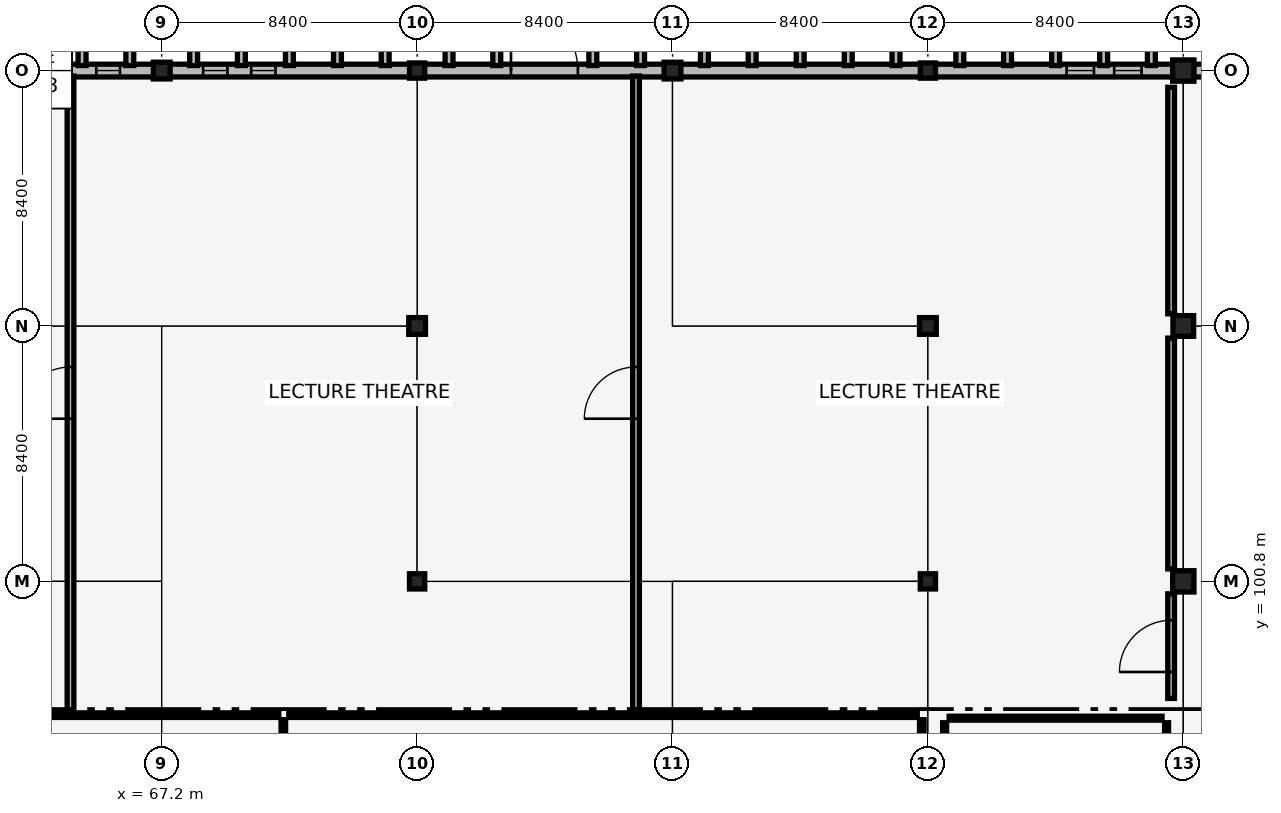
"""IFC4 building model, lengths in metres.
Left out: names, types, materials, properties, quantities, classifications, styles, units other than length and angle.
Written with IfcOpenShell. Run it as: python <this file> out.ifc"""

import sys

from ifc_helpers import new_model, si_unit, direction, frame, frame_2d, origin, origin_2d, place, context, subcontext, project, spatial, rectangle, extrude, element, fill, save


model = new_model("IFC4")
c1 = context("Model", 3, precision=1e-05, world=origin(), true_north=direction((0.0, 1.0)))
c2 = subcontext(c1, "Body", "Model", "MODEL_VIEW")
j1 = project(units=[si_unit("LENGTHUNIT", "METRE"), si_unit("PLANEANGLEUNIT", "RADIAN")], contexts=[c1])
p1 = place(None, origin())
s1 = spatial("IfcSite", under=j1, at=p1, CompositionType="ELEMENT")
p2 = place(p1, origin())
s2 = spatial("IfcBuilding", under=s1, at=p2, CompositionType="ELEMENT")
p3 = place(p2, origin())
s3 = spatial("IfcBuildingStorey", under=s2, at=p3, CompositionType="ELEMENT", Elevation=0.0)
p4 = place(p3, frame((67.2, 117.6, -0.32), z_axis=(0.0, 0.0, 1.0), x_axis=(1.0, 0.0, 0.0)))
e1 = element("IfcColumn", 1, at=p4, inside=s3, PredefinedType="COLUMN", context=c2, shape_type="SweptSolid", body=[
    extrude(rectangle(XDim=0.55, YDim=0.55, at=origin_2d()), origin(), (0.0, 0.0, 1.0), 5.46),
])
p5 = place(p3, frame((75.6, 100.8, -0.32), z_axis=(0.0, 0.0, 1.0), x_axis=(1.0, 0.0, 0.0)))
e2 = element("IfcColumn", 2, at=p5, inside=s3, PredefinedType="COLUMN", context=c2, shape_type="SweptSolid", body=[
    extrude(rectangle(XDim=0.5, YDim=0.5, at=origin_2d()), origin(), (0.0, 0.0, 1.0), 5.46),
])
p6 = place(p3, frame((75.6, 109.2, -0.32), z_axis=(0.0, 0.0, 1.0), x_axis=(1.0, 0.0, 0.0)))
e3 = element("IfcColumn", 3, at=p6, inside=s3, PredefinedType="COLUMN", context=c2, shape_type="SweptSolid", body=[
    extrude(rectangle(XDim=0.55, YDim=0.55, at=origin_2d()), origin(), (0.0, 0.0, 1.0), 5.46),
])
p7 = place(p3, frame((75.6, 117.6, -0.32), z_axis=(0.0, 0.0, 1.0), x_axis=(1.0, 0.0, 0.0)))
e4 = element("IfcColumn", 4, at=p7, inside=s3, PredefinedType="COLUMN", context=c2, shape_type="SweptSolid", body=[
    extrude(rectangle(XDim=0.5, YDim=0.5, at=origin_2d()), origin(), (0.0, 0.0, 1.0), 5.46),
])
p8 = place(p3, frame((84.0, 117.6, -0.32), z_axis=(0.0, 0.0, 1.0), x_axis=(1.0, 0.0, 0.0)))
e5 = element("IfcColumn", 5, at=p8, inside=s3, PredefinedType="COLUMN", context=c2, shape_type="SweptSolid", body=[
    extrude(rectangle(XDim=0.55, YDim=0.55, at=origin_2d()), origin(), (0.0, 0.0, 1.0), 5.46),
])
p9 = place(p3, frame((92.4, 100.8, -0.32), z_axis=(0.0, 0.0, 1.0), x_axis=(1.0, 0.0, 0.0)))
e6 = element("IfcColumn", 6, at=p9, inside=s3, PredefinedType="COLUMN", context=c2, shape_type="SweptSolid", body=[
    extrude(rectangle(XDim=0.5, YDim=0.5, at=origin_2d()), origin(), (0.0, 0.0, 1.0), 5.46),
])
p10 = place(p3, frame((92.4, 109.2, -0.32), z_axis=(0.0, 0.0, 1.0), x_axis=(1.0, 0.0, 0.0)))
e7 = element("IfcColumn", 7, at=p10, inside=s3, PredefinedType="COLUMN", context=c2, shape_type="SweptSolid", body=[
    extrude(rectangle(XDim=0.55, YDim=0.55, at=origin_2d()), origin(), (0.0, 0.0, 1.0), 5.46),
])
p11 = place(p3, frame((92.4, 117.6, -0.32), z_axis=(0.0, 0.0, 1.0), x_axis=(1.0, 0.0, 0.0)))
e8 = element("IfcColumn", 8, at=p11, inside=s3, PredefinedType="COLUMN", context=c2, shape_type="SweptSolid", body=[
    extrude(rectangle(XDim=0.5, YDim=0.5, at=origin_2d()), origin(), (0.0, 0.0, 1.0), 5.46),
])
p12 = place(p3, frame((100.8, 100.8, 0.0), z_axis=(0.0, 0.0, 1.0), x_axis=(1.0, 0.0, 0.0)))
e9 = element("IfcColumn", 9, at=p12, inside=s3, PredefinedType="COLUMN", context=c2, shape_type="SweptSolid", body=[
    extrude(rectangle(XDim=0.7, YDim=0.7, at=origin_2d()), origin(), (0.0, 0.0, 1.0), 5.14),
])
p13 = place(p3, frame((100.8, 109.2, 0.0), z_axis=(0.0, 0.0, 1.0), x_axis=(1.0, 0.0, 0.0)))
e10 = element("IfcColumn", 10, at=p13, inside=s3, PredefinedType="COLUMN", context=c2, shape_type="SweptSolid", body=[
    extrude(rectangle(XDim=0.68, YDim=0.68, at=origin_2d()), origin(), (0.0, 0.0, 1.0), 5.14),
])
p14 = place(p3, frame((100.8, 117.6, 0.0), z_axis=(0.0, 0.0, 1.0), x_axis=(1.0, 0.0, 0.0)))
e11 = element("IfcColumn", 11, at=p14, inside=s3, PredefinedType="COLUMN", context=c2, shape_type="SweptSolid", body=[
    extrude(rectangle(XDim=0.7, YDim=0.7, at=origin_2d()), origin(), (0.0, 0.0, 1.0), 5.14),
])
p15 = place(p3, frame((59.035, 117.6, 0.0), z_axis=(0.0, 0.0, 1.0), x_axis=(1.0, 0.0, 0.0)))
e12 = element("IfcWall", 12, at=p15, inside=s3, PredefinedType="SOLIDWALL", context=c2, shape_type="SweptSolid", body=[
    extrude(rectangle(XDim=7.905, YDim=0.42, at=frame_2d((3.953, 0.0))), origin(), (0.0, 0.0, 1.0), 4.4),
])
p16 = place(p15, frame((2.693, 0.0, 0.75)))
e13 = element("IfcOpeningElement", 13, at=p16, cuts=e12, PredefinedType="OPENING", context=c2, shape_type="SweptSolid", body=[
    extrude(rectangle(XDim=0.78, YDim=2.7, at=frame_2d((0.39, 1.35))), frame((0.0, 0.22, 0.0), z_axis=(0.0, -1.0, 0.0), x_axis=(1.0, 0.0, 0.0)), (0.0, 0.0, 1.0), 0.44),
])
p17 = place(p15, frame((6.013, 0.0, 0.75)))
e14 = element("IfcOpeningElement", 14, at=p17, cuts=e12, PredefinedType="OPENING", context=c2, shape_type="SweptSolid", body=[
    extrude(rectangle(XDim=0.78, YDim=2.7, at=frame_2d((0.39, 1.35))), frame((0.0, 0.22, 0.0), z_axis=(0.0, -1.0, 0.0), x_axis=(1.0, 0.0, 0.0)), (0.0, 0.0, 1.0), 0.44),
])
for number, where, z_axis, x_axis in (
    (15, (64.58, 117.765, -0.32), (0.0, 0.0, 1.0), (0.0, 1.0, 0.0)),
    (16, (66.15, 117.765, -0.32), (0.0, 0.0, 1.0), (0.0, 1.0, 0.0)),
):
    element("IfcWall", number, at=place(p3, frame(where, z_axis=z_axis, x_axis=x_axis)), inside=s3, PredefinedType="SOLIDWALL", context=c2, shape_type="SweptSolid", body=[
        extrude(rectangle(XDim=0.7, YDim=0.26, at=frame_2d((0.35, 0.0))), origin(), (0.0, 0.0, 1.0), 5.76),
    ])
p18 = place(p3, frame((67.46, 117.6, 0.0), z_axis=(0.0, 0.0, 1.0), x_axis=(1.0, 0.0, 0.0)))
e17 = element("IfcWall", 17, at=p18, inside=s3, PredefinedType="SOLIDWALL", context=c2, shape_type="SweptSolid", body=[
    extrude(rectangle(XDim=7.905, YDim=0.42, at=frame_2d((3.953, 0.0))), origin(), (0.0, 0.0, 1.0), 4.4),
])
p19 = place(p18, frame((1.102, 0.0, 0.75)))
e18 = element("IfcOpeningElement", 18, at=p19, cuts=e17, PredefinedType="OPENING", context=c2, shape_type="SweptSolid", body=[
    extrude(rectangle(XDim=0.8, YDim=2.55, at=frame_2d((0.4, 1.275))), frame((0.0, 0.22, 0.0), z_axis=(0.0, -1.0, 0.0), x_axis=(1.0, 0.0, 0.0)), (0.0, 0.0, 1.0), 0.44),
])
p20 = place(p18, frame((2.683, 0.0, 0.75)))
e19 = element("IfcOpeningElement", 19, at=p20, cuts=e17, PredefinedType="OPENING", context=c2, shape_type="SweptSolid", body=[
    extrude(rectangle(XDim=0.8, YDim=2.55, at=frame_2d((0.4, 1.275))), frame((0.0, 0.22, 0.0), z_axis=(0.0, -1.0, 0.0), x_axis=(1.0, 0.0, 0.0)), (0.0, 0.0, 1.0), 0.44),
])
for number, where, z_axis, x_axis in (
    (20, (68.25, 117.765, -0.32), (0.0, 0.0, 1.0), (0.0, 1.0, 0.0)),
    (21, (69.82, 117.765, -0.32), (0.0, 0.0, 1.0), (0.0, 1.0, 0.0)),
    (22, (71.4, 117.765, -0.32), (0.0, 0.0, 1.0), (0.0, 1.0, 0.0)),
    (23, (72.98, 117.765, -0.32), (0.0, 0.0, 1.0), (0.0, 1.0, 0.0)),
    (24, (74.55, 117.765, -0.32), (0.0, 0.0, 1.0), (0.0, 1.0, 0.0)),
):
    element("IfcWall", number, at=place(p3, frame(where, z_axis=z_axis, x_axis=x_axis)), inside=s3, PredefinedType="SOLIDWALL", context=c2, shape_type="SweptSolid", body=[
        extrude(rectangle(XDim=0.7, YDim=0.26, at=frame_2d((0.35, 0.0))), origin(), (0.0, 0.0, 1.0), 5.76),
    ])
p21 = place(p3, frame((75.835, 117.6, 0.0), z_axis=(0.0, 0.0, 1.0), x_axis=(1.0, 0.0, 0.0)))
e25 = element("IfcWall", 25, at=p21, inside=s3, PredefinedType="SOLIDWALL", context=c2, shape_type="SweptSolid", body=[
    extrude(rectangle(XDim=7.905, YDim=0.42, at=frame_2d((3.953, 0.0))), origin(), (0.0, 0.0, 1.0), 4.4),
])
p22 = place(p21, frame((2.853, 0.0, 0.0)))
e26 = element("IfcOpeningElement", 26, at=p22, cuts=e25, PredefinedType="OPENING", context=c2, shape_type="SweptSolid", body=[
    extrude(rectangle(XDim=2.2, YDim=2.4, at=frame_2d((1.1, 1.2))), frame((0.0, 0.22, 0.0), z_axis=(0.0, -1.0, 0.0), x_axis=(1.0, 0.0, 0.0)), (0.0, 0.0, 1.0), 0.44),
])
for number, where, z_axis, x_axis in (
    (27, (76.65, 117.765, -0.32), (0.0, 0.0, 1.0), (0.0, 1.0, 0.0)),
    (28, (78.22, 117.765, -0.32), (0.0, 0.0, 1.0), (0.0, 1.0, 0.0)),
    (29, (81.38, 117.765, -0.32), (0.0, 0.0, 1.0), (0.0, 1.0, 0.0)),
    (30, (82.95, 117.765, -0.32), (0.0, 0.0, 1.0), (0.0, 1.0, 0.0)),
):
    element("IfcWall", number, at=place(p3, frame(where, z_axis=z_axis, x_axis=x_axis)), inside=s3, PredefinedType="SOLIDWALL", context=c2, shape_type="SweptSolid", body=[
        extrude(rectangle(XDim=0.7, YDim=0.26, at=frame_2d((0.35, 0.0))), origin(), (0.0, 0.0, 1.0), 5.76),
    ])
p23 = place(p3, frame((84.26, 117.6, 0.0), z_axis=(0.0, 0.0, 1.0), x_axis=(1.0, 0.0, 0.0)))
e31 = element("IfcWall", 31, at=p23, inside=s3, PredefinedType="SOLIDWALL", context=c2, shape_type="SweptSolid", body=[
    extrude(rectangle(XDim=7.905, YDim=0.42, at=frame_2d((3.953, 0.0))), origin(), (0.0, 0.0, 1.0), 4.4),
])
for number, where, z_axis, x_axis in (
    (32, (85.05, 117.765, -0.32), (0.0, 0.0, 1.0), (0.0, 1.0, 0.0)),
    (33, (86.62, 117.765, -0.32), (0.0, 0.0, 1.0), (0.0, 1.0, 0.0)),
    (34, (88.2, 117.765, -0.32), (0.0, 0.0, 1.0), (0.0, 1.0, 0.0)),
    (35, (89.78, 117.765, -0.32), (0.0, 0.0, 1.0), (0.0, 1.0, 0.0)),
    (36, (91.35, 117.765, -0.32), (0.0, 0.0, 1.0), (0.0, 1.0, 0.0)),
):
    element("IfcWall", number, at=place(p3, frame(where, z_axis=z_axis, x_axis=x_axis)), inside=s3, PredefinedType="SOLIDWALL", context=c2, shape_type="SweptSolid", body=[
        extrude(rectangle(XDim=0.7, YDim=0.26, at=frame_2d((0.35, 0.0))), origin(), (0.0, 0.0, 1.0), 5.76),
    ])
p24 = place(p3, frame((92.635, 117.6, 0.0), z_axis=(0.0, 0.0, 1.0), x_axis=(1.0, 0.0, 0.0)))
e37 = element("IfcWall", 37, at=p24, inside=s3, PredefinedType="SOLIDWALL", context=c2, shape_type="SweptSolid", body=[
    extrude(rectangle(XDim=7.83, YDim=0.42, at=frame_2d((3.915, 0.0))), origin(), (0.0, 0.0, 1.0), 4.4),
])
p25 = place(p24, frame((4.326, 0.0, 0.75)))
e38 = element("IfcOpeningElement", 38, at=p25, cuts=e37, PredefinedType="OPENING", context=c2, shape_type="SweptSolid", body=[
    extrude(rectangle(XDim=0.9, YDim=3.0, at=frame_2d((0.45, 1.5))), frame((0.0, 0.22, 0.0), z_axis=(0.0, -1.0, 0.0), x_axis=(1.0, 0.0, 0.0)), (0.0, 0.0, 1.0), 0.44),
])
p26 = place(p24, frame((5.892, 0.0, 0.75)))
e39 = element("IfcOpeningElement", 39, at=p26, cuts=e37, PredefinedType="OPENING", context=c2, shape_type="SweptSolid", body=[
    extrude(rectangle(XDim=0.9, YDim=3.0, at=frame_2d((0.45, 1.5))), frame((0.0, 0.22, 0.0), z_axis=(0.0, -1.0, 0.0), x_axis=(1.0, 0.0, 0.0)), (0.0, 0.0, 1.0), 0.44),
])
for number, where, z_axis, x_axis in (
    (40, (93.45, 117.765, -0.32), (0.0, 0.0, 1.0), (0.0, 1.0, 0.0)),
    (41, (95.02, 117.765, -0.32), (0.0, 0.0, 1.0), (0.0, 1.0, 0.0)),
    (42, (96.6, 117.765, -0.32), (0.0, 0.0, 1.0), (0.0, 1.0, 0.0)),
    (43, (98.18, 117.765, -0.32), (0.0, 0.0, 1.0), (0.0, 1.0, 0.0)),
):
    element("IfcWall", number, at=place(p3, frame(where, z_axis=z_axis, x_axis=x_axis)), inside=s3, PredefinedType="SOLIDWALL", context=c2, shape_type="SweptSolid", body=[
        extrude(rectangle(XDim=0.7, YDim=0.26, at=frame_2d((0.35, 0.0))), origin(), (0.0, 0.0, 1.0), 5.76),
    ])
p27 = place(p3, frame((99.75, 117.765, -0.25), z_axis=(0.0, 0.0, 1.0), x_axis=(0.0, 1.0, 0.0)))
e44 = element("IfcWall", 44, at=p27, inside=s3, PredefinedType="SOLIDWALL", context=c2, shape_type="SweptSolid", body=[
    extrude(rectangle(XDim=0.7, YDim=0.26, at=frame_2d((0.35, 0.0))), origin(), (0.0, 0.0, 1.0), 5.69),
])
p28 = place(p3, frame((101.135, 117.6, 0.0), z_axis=(0.0, 0.0, 1.0), x_axis=(1.0, 0.0, 0.0)))
e45 = element("IfcWall", 45, at=p28, inside=s3, PredefinedType="SOLIDWALL", context=c2, shape_type="SweptSolid", body=[
    extrude(rectangle(XDim=7.74, YDim=0.42, at=frame_2d((3.87, 0.0))), origin(), (0.0, 0.0, 1.0), 4.4),
])
p29 = place(p3, frame((50.75, 96.4, 0.0), z_axis=(0.0, 0.0, 1.0), x_axis=(1.0, 0.0, 0.0)))
e46 = element("IfcWall", 46, at=p29, inside=s3, PredefinedType="PARTITIONING", context=c2, shape_type="SweptSolid", body=[
    extrude(rectangle(XDim=20.3, YDim=0.15, at=frame_2d((10.15, 0.0))), origin(), (0.0, 0.0, 1.0), 4.74),
])
p30 = place(p3, frame((71.2, 87.45, 0.0), z_axis=(0.0, 0.0, 1.0), x_axis=(0.0, 1.0, 0.0)))
e47 = element("IfcWall", 47, at=p30, inside=s3, PredefinedType="PARTITIONING", context=c2, shape_type="SweptSolid", body=[
    extrude(rectangle(XDim=8.8, YDim=0.15, at=frame_2d((4.4, 0.0))), origin(), (0.0, 0.0, 1.0), 4.46),
])
p31 = place(p3, frame((71.38, 96.4, 0.0), z_axis=(0.0, 0.0, 1.0), x_axis=(1.0, 0.0, 0.0)))
e48 = element("IfcWall", 48, at=p31, inside=s3, PredefinedType="PARTITIONING", context=c2, shape_type="SweptSolid", body=[
    extrude(rectangle(XDim=20.67, YDim=0.15, at=frame_2d((10.335, 0.0))), origin(), (0.0, 0.0, 1.0), 4.74),
])
p32 = place(p3, frame((92.2, 92.735, 0.0), z_axis=(0.0, 0.0, 1.0), x_axis=(0.0, 1.0, 0.0)))
e49 = element("IfcWall", 49, at=p32, inside=s3, PredefinedType="PARTITIONING", context=c2, shape_type="SweptSolid", body=[
    extrude(rectangle(XDim=3.515, YDim=0.15, at=frame_2d((1.757, 0.0))), origin(), (0.0, 0.0, 1.0), 5.14),
])
p33 = place(p3, frame((93.1, 96.3, 0.0), z_axis=(0.0, 0.0, 1.0), x_axis=(1.0, 0.0, 0.0)))
e50 = element("IfcWall", 50, at=p33, inside=s3, PredefinedType="PARTITIONING", context=c2, shape_type="SweptSolid", body=[
    extrude(rectangle(XDim=7.0, YDim=0.13, at=frame_2d((3.5, 0.0))), origin(), (0.0, 0.0, 1.0), 5.14),
])
for number, where, z_axis, x_axis in (
    (51, (92.95, 87.5, 0.0), (0.0, 0.0, 1.0), (0.0, 1.0, 0.0)),
    (52, (100.25, 87.5, 0.0), (0.0, 0.0, 1.0), (0.0, 1.0, 0.0)),
):
    element("IfcWall", number, at=place(p3, frame(where, z_axis=z_axis, x_axis=x_axis)), inside=s3, PredefinedType="PARTITIONING", context=c2, shape_type="SweptSolid", body=[
        extrude(rectangle(XDim=8.65, YDim=0.13, at=frame_2d((4.325, 0.0))), origin(), (0.0, 0.0, 1.0), 4.46),
    ])
p34 = place(p3, frame((64.2, 96.58, 0.0), z_axis=(0.0, 0.0, 1.0), x_axis=(0.0, 1.0, 0.0)))
e53 = element("IfcWall", 53, at=p34, inside=s3, PredefinedType="PARTITIONING", context=c2, shape_type="SweptSolid", body=[
    extrude(rectangle(XDim=20.84, YDim=0.22, at=frame_2d((10.42, 0.0))), origin(), (0.0, 0.0, 1.0), 3.74),
])
p35 = place(p34, frame((9.57, 0.0, 0.0)))
e54 = element("IfcOpeningElement", 54, at=p35, cuts=e53, PredefinedType="OPENING", context=c2, shape_type="SweptSolid", body=[
    extrude(rectangle(XDim=1.7, YDim=2.25, at=frame_2d((0.85, 1.125))), frame((0.0, 0.12, 0.0), z_axis=(0.0, -1.0, 0.0), x_axis=(1.0, 0.0, 0.0)), (0.0, 0.0, 1.0), 0.24),
])
p36 = place(p3, frame((82.8, 96.58, 0.0), z_axis=(0.0, 0.0, 1.0), x_axis=(0.0, 1.0, 0.0)))
e55 = element("IfcWall", 55, at=p36, inside=s3, PredefinedType="PARTITIONING", context=c2, shape_type="SweptSolid", body=[
    extrude(rectangle(XDim=20.84, YDim=0.22, at=frame_2d((10.42, 0.0))), origin(), (0.0, 0.0, 1.0), 3.74),
])
p37 = place(p36, frame((9.57, 0.0, 0.0)))
e56 = element("IfcOpeningElement", 56, at=p37, cuts=e55, PredefinedType="OPENING", context=c2, shape_type="SweptSolid", body=[
    extrude(rectangle(XDim=1.7, YDim=2.25, at=frame_2d((0.85, 1.125))), frame((0.0, 0.12, 0.0), z_axis=(0.0, -1.0, 0.0), x_axis=(1.0, 0.0, 0.0)), (0.0, 0.0, 1.0), 0.24),
])
p38 = place(p3, frame((100.4, 96.95, 0.0), z_axis=(0.0, 0.0, 1.0), x_axis=(0.0, 1.0, 0.0)))
e57 = element("IfcWall", 57, at=p38, inside=s3, PredefinedType="PARTITIONING", context=c2, shape_type="SweptSolid", body=[
    extrude(rectangle(XDim=3.44, YDim=0.22, at=frame_2d((1.72, 0.0))), origin(), (0.0, 0.0, 1.0), 5.14),
])
p39 = place(p38, frame((0.87, 0.0, 0.0)))
e58 = element("IfcOpeningElement", 58, at=p39, cuts=e57, PredefinedType="OPENING", context=c2, shape_type="SweptSolid", body=[
    extrude(rectangle(XDim=1.7, YDim=2.25, at=frame_2d((0.85, 1.125))), frame((0.0, 0.12, 0.0), z_axis=(0.0, -1.0, 0.0), x_axis=(1.0, 0.0, 0.0)), (0.0, 0.0, 1.0), 0.24),
])
p40 = place(p3, frame((100.4, 101.21, 0.0), z_axis=(0.0, 0.0, 1.0), x_axis=(0.0, 1.0, 0.0)))
e59 = element("IfcWall", 59, at=p40, inside=s3, PredefinedType="PARTITIONING", context=c2, shape_type="SweptSolid", body=[
    extrude(rectangle(XDim=7.59, YDim=0.22, at=frame_2d((3.795, 0.0))), origin(), (0.0, 0.0, 1.0), 5.14),
])
p41 = place(p3, frame((100.4, 109.6, 0.0), z_axis=(0.0, 0.0, 1.0), x_axis=(0.0, 1.0, 0.0)))
e60 = element("IfcWall", 60, at=p41, inside=s3, PredefinedType="PARTITIONING", context=c2, shape_type="SweptSolid", body=[
    extrude(rectangle(XDim=7.45, YDim=0.22, at=frame_2d((3.725, 0.0))), origin(), (0.0, 0.0, 1.0), 4.59),
])
p42 = place(p17, origin())
e61 = element("IfcWindow", 61, at=p42, inside=s3, PartitioningType="DOUBLE_PANEL_VERTICAL", PredefinedType="WINDOW", context=c2, shape_type="SweptSolid", body=[
    extrude(rectangle(XDim=0.78, YDim=2.7, at=frame_2d((0.39, 1.35))), frame((0.0, 0.03, 0.0), z_axis=(0.0, -1.0, 0.0), x_axis=(1.0, 0.0, 0.0)), (0.0, 0.0, 1.0), 0.06),
])
fill(e14, e61)
p43 = place(p19, origin())
e62 = element("IfcWindow", 62, at=p43, inside=s3, PartitioningType="DOUBLE_PANEL_VERTICAL", PredefinedType="WINDOW", context=c2, shape_type="SweptSolid", body=[
    extrude(rectangle(XDim=0.8, YDim=2.55, at=frame_2d((0.4, 1.275))), frame((0.0, 0.03, 0.0), z_axis=(0.0, -1.0, 0.0), x_axis=(1.0, 0.0, 0.0)), (0.0, 0.0, 1.0), 0.06),
])
fill(e18, e62)
p44 = place(p20, origin())
e63 = element("IfcWindow", 63, at=p44, inside=s3, PartitioningType="DOUBLE_PANEL_VERTICAL", PredefinedType="WINDOW", context=c2, shape_type="SweptSolid", body=[
    extrude(rectangle(XDim=0.8, YDim=2.55, at=frame_2d((0.4, 1.275))), frame((0.0, 0.03, 0.0), z_axis=(0.0, -1.0, 0.0), x_axis=(1.0, 0.0, 0.0)), (0.0, 0.0, 1.0), 0.06),
])
fill(e19, e63)
p45 = place(p22, origin())
e64 = element("IfcDoor", 64, at=p45, inside=s3, OperationType="DOUBLE_DOOR_SINGLE_SWING", PredefinedType="DOOR", context=c2, shape_type="SweptSolid", body=[
    extrude(rectangle(XDim=2.2, YDim=2.4, at=frame_2d((1.1, 1.2))), frame((0.0, 0.025, 0.0), z_axis=(0.0, -1.0, 0.0), x_axis=(1.0, 0.0, 0.0)), (0.0, 0.0, 1.0), 0.05),
])
fill(e26, e64)
p46 = place(p25, origin())
e65 = element("IfcWindow", 65, at=p46, inside=s3, PartitioningType="DOUBLE_PANEL_VERTICAL", PredefinedType="WINDOW", context=c2, shape_type="SweptSolid", body=[
    extrude(rectangle(XDim=0.9, YDim=3.0, at=frame_2d((0.45, 1.5))), frame((0.0, 0.03, 0.0), z_axis=(0.0, -1.0, 0.0), x_axis=(1.0, 0.0, 0.0)), (0.0, 0.0, 1.0), 0.06),
])
fill(e38, e65)
p47 = place(p26, origin())
e66 = element("IfcWindow", 66, at=p47, inside=s3, PartitioningType="DOUBLE_PANEL_VERTICAL", PredefinedType="WINDOW", context=c2, shape_type="SweptSolid", body=[
    extrude(rectangle(XDim=0.9, YDim=3.0, at=frame_2d((0.45, 1.5))), frame((0.0, 0.03, 0.0), z_axis=(0.0, -1.0, 0.0), x_axis=(1.0, 0.0, 0.0)), (0.0, 0.0, 1.0), 0.06),
])
fill(e39, e66)
p48 = place(p35, origin())
e67 = element("IfcDoor", 67, at=p48, inside=s3, OperationType="DOUBLE_DOOR_SINGLE_SWING", PredefinedType="DOOR", context=c2, shape_type="SweptSolid", body=[
    extrude(rectangle(XDim=1.7, YDim=2.25, at=frame_2d((0.85, 1.125))), frame((0.0, 0.025, 0.0), z_axis=(0.0, -1.0, 0.0), x_axis=(1.0, 0.0, 0.0)), (0.0, 0.0, 1.0), 0.05),
])
fill(e54, e67)
p49 = place(p37, origin())
e68 = element("IfcDoor", 68, at=p49, inside=s3, OperationType="DOUBLE_DOOR_SINGLE_SWING", PredefinedType="DOOR", context=c2, shape_type="SweptSolid", body=[
    extrude(rectangle(XDim=1.7, YDim=2.25, at=frame_2d((0.85, 1.125))), frame((0.0, 0.025, 0.0), z_axis=(0.0, -1.0, 0.0), x_axis=(1.0, 0.0, 0.0)), (0.0, 0.0, 1.0), 0.05),
])
fill(e56, e68)
p50 = place(p39, origin())
e69 = element("IfcDoor", 69, at=p50, inside=s3, OperationType="DOUBLE_DOOR_SINGLE_SWING", PredefinedType="DOOR", context=c2, shape_type="SweptSolid", body=[
    extrude(rectangle(XDim=1.7, YDim=2.25, at=frame_2d((0.85, 1.125))), frame((0.0, 0.025, 0.0), z_axis=(0.0, -1.0, 0.0), x_axis=(1.0, 0.0, 0.0)), (0.0, 0.0, 1.0), 0.05),
])
fill(e58, e69)
save(model, sys.argv[1])
